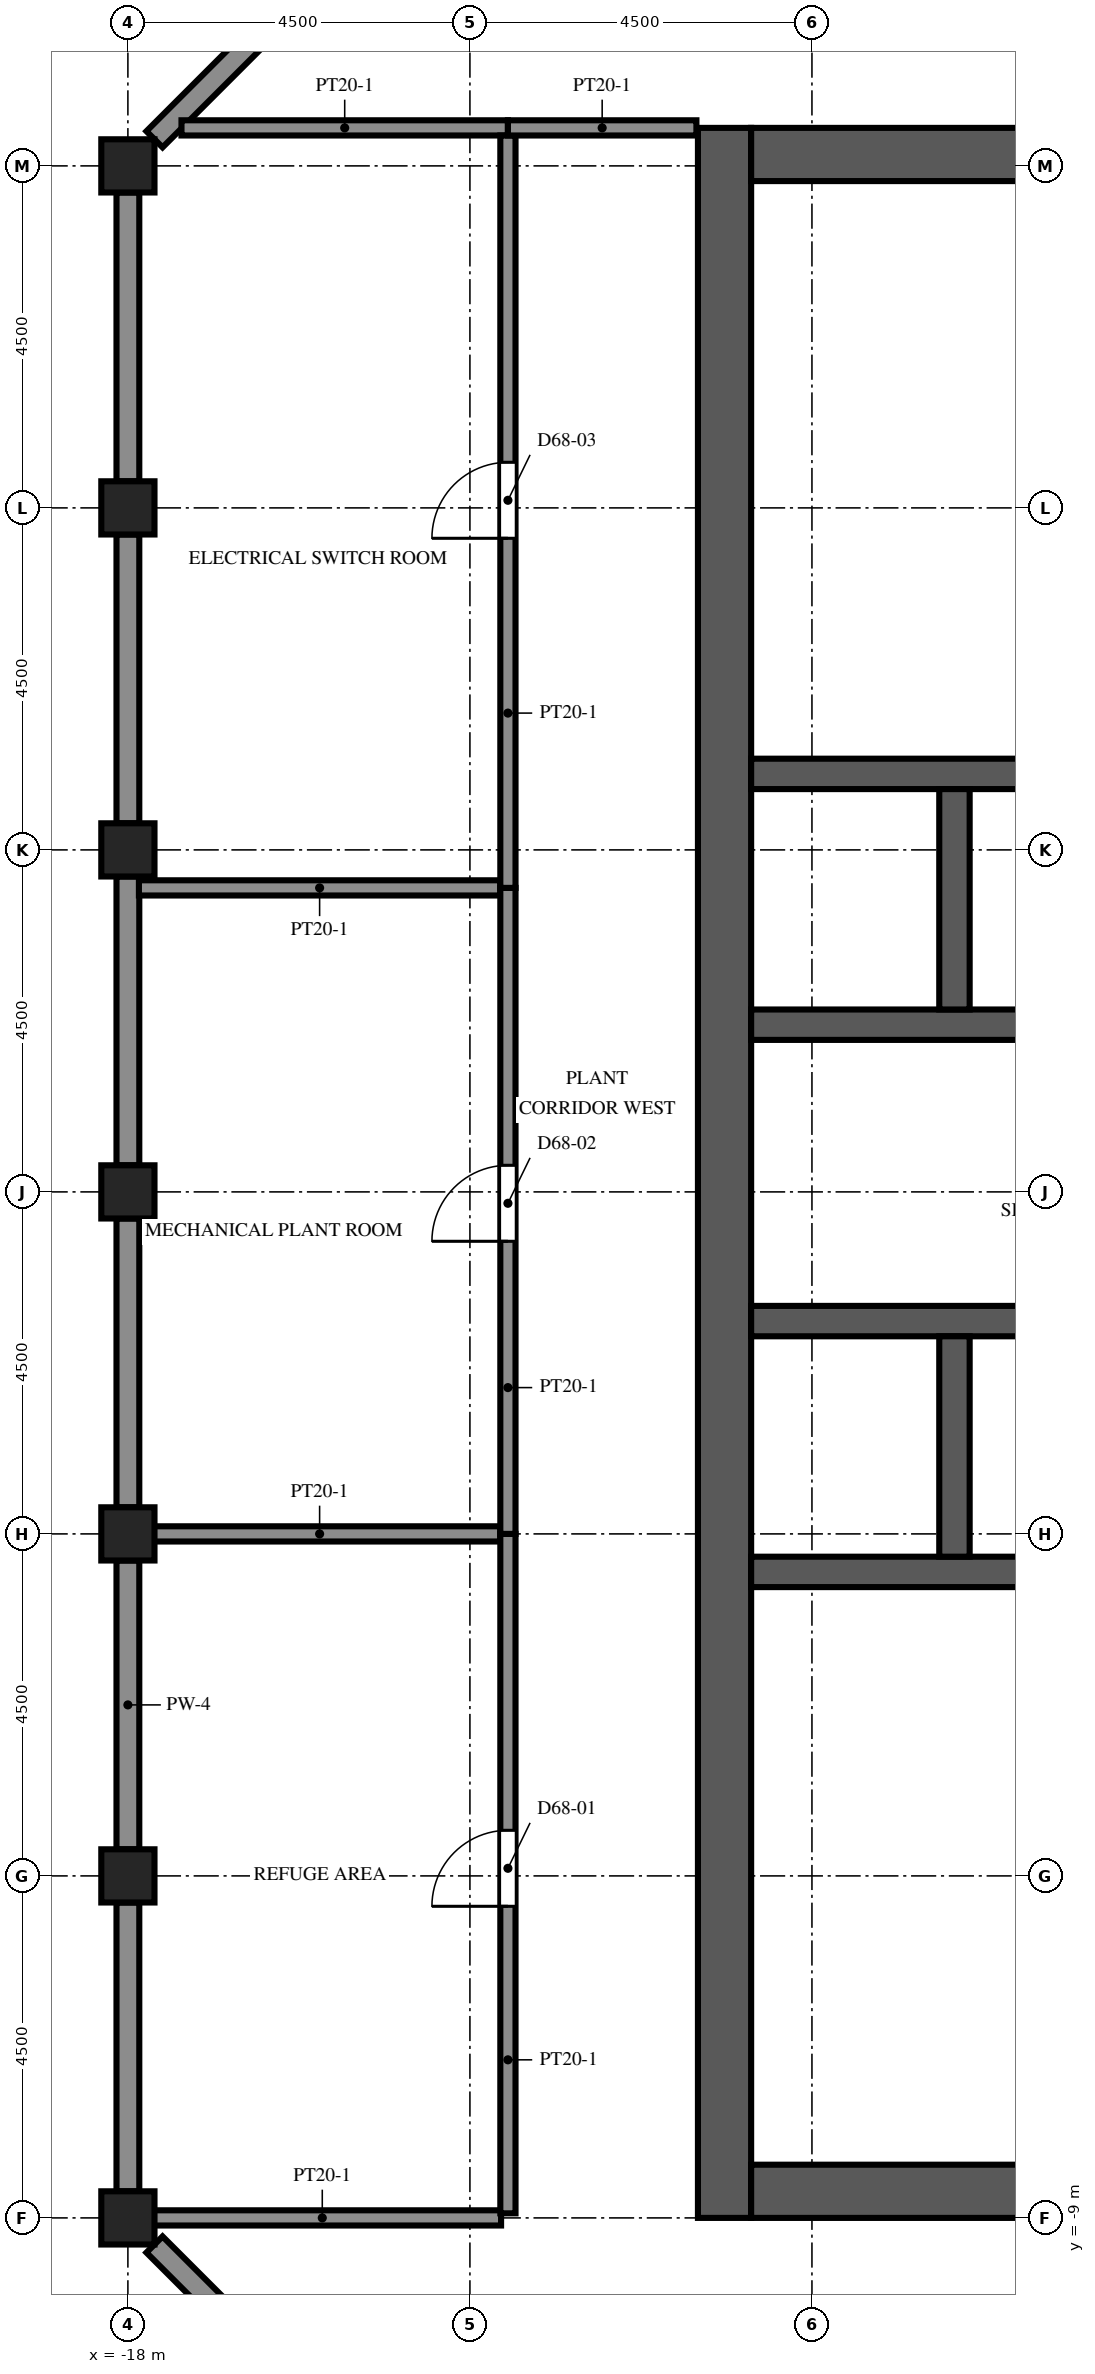
"""IFC4 building model, lengths in metres.
Left out: names, types, materials, properties, quantities, classifications, styles, units other than length and angle.
Written with IfcOpenShell. Run it as: python <this file> out.ifc"""

import sys

from ifc_helpers import new_model, si_unit, direction, frame, frame_2d, origin, origin_2d, place, context, subcontext, project, spatial, rectangle, extrude, element, fill, save


model = new_model("IFC4")
c1 = context("Model", 3, precision=1e-05, world=origin(), true_north=direction((0.0, 1.0)))
c2 = subcontext(c1, "Body", "Model", "MODEL_VIEW")
j1 = project(units=[si_unit("LENGTHUNIT", "METRE"), si_unit("PLANEANGLEUNIT", "RADIAN")], contexts=[c1])
p1 = place(None, origin())
s1 = spatial("IfcSite", under=j1, at=p1, CompositionType="ELEMENT")
p2 = place(p1, origin())
s2 = spatial("IfcBuilding", under=s1, at=p2, CompositionType="ELEMENT")
p3 = place(p2, frame((0.0, 0.0, 301.0)))
s3 = spatial("IfcBuildingStorey", under=s2, at=p3, CompositionType="ELEMENT", Elevation=301.0)
for number, where, z_axis, x_axis in (
    (1, (-18.0, -9.0, -0.6), (0.0, 0.0, 1.0), (1.0, 0.0, 0.0)),
    (2, (-18.0, -4.5, -0.6), (0.0, 0.0, 1.0), (1.0, 0.0, 0.0)),
    (3, (-18.0, 0.0, -0.6), (0.0, 0.0, 1.0), (1.0, 0.0, 0.0)),
    (4, (-18.0, 4.5, -0.6), (0.0, 0.0, 1.0), (1.0, 0.0, 0.0)),
    (5, (-18.0, 9.0, -0.6), (0.0, 0.0, 1.0), (1.0, 0.0, 0.0)),
    (6, (-18.0, 13.5, -0.6), (0.0, 0.0, 1.0), (1.0, 0.0, 0.0)),
    (7, (-18.0, 18.0, -0.6), (0.0, 0.0, 1.0), (1.0, 0.0, 0.0)),
):
    element("IfcColumn", number, at=place(p3, frame(where, z_axis=z_axis, x_axis=x_axis)), inside=s3, PredefinedType="COLUMN", context=c2, shape_type="SweptSolid", body=[
        extrude(rectangle(XDim=0.7, YDim=0.7, at=origin_2d()), origin(), (0.0, 0.0, 1.0), 6.0),
    ])
p4 = place(p3, frame((-10.15, -9.0, 0.0), z_axis=(0.0, 0.0, 1.0), x_axis=(0.0, 1.0, 0.0)))
e8 = element("IfcWall", 8, at=p4, inside=s3, PredefinedType="SHEAR", context=c2, shape_type="SweptSolid", body=[
    extrude(rectangle(XDim=27.5, YDim=0.7, at=frame_2d((13.75, 0.0))), origin(), (0.0, 0.0, 1.0), 5.4),
])
p5 = place(p4, frame((12.55, 0.0, 0.0)))
e9 = element("IfcOpeningElement", 9, at=p5, cuts=e8, PredefinedType="OPENING", context=c2, shape_type="SweptSolid", body=[
    extrude(rectangle(XDim=2.4, YDim=2.4, at=frame_2d((1.2, 1.2))), frame((0.0, 0.36, 0.0), z_axis=(0.0, -1.0, 0.0), x_axis=(1.0, 0.0, 0.0)), (0.0, 0.0, 1.0), 0.72),
])
p6 = place(p4, frame((6.825, 0.0, 0.0)))
e10 = element("IfcOpeningElement", 10, at=p6, cuts=e8, PredefinedType="OPENING", context=c2, shape_type="SweptSolid", body=[
    extrude(rectangle(XDim=1.2, YDim=2.1, at=frame_2d((0.6, 1.05))), frame((0.0, 0.36, 0.0), z_axis=(0.0, -1.0, 0.0), x_axis=(1.0, 0.0, 0.0)), (0.0, 0.0, 1.0), 0.72),
])
p7 = place(p4, frame((19.475, 0.0, 0.0)))
e11 = element("IfcOpeningElement", 11, at=p7, cuts=e8, PredefinedType="OPENING", context=c2, shape_type="SweptSolid", body=[
    extrude(rectangle(XDim=1.2, YDim=2.1, at=frame_2d((0.6, 1.05))), frame((0.0, 0.36, 0.0), z_axis=(0.0, -1.0, 0.0), x_axis=(1.0, 0.0, 0.0)), (0.0, 0.0, 1.0), 0.72),
])
for number, where, z_axis, x_axis in (
    (12, (-9.8, -8.65, 0.0), (0.0, 0.0, 1.0), (1.0, 0.0, 0.0)),
    (13, (-9.8, 18.15, 0.0), (0.0, 0.0, 1.0), (1.0, 0.0, 0.0)),
):
    element("IfcWall", number, at=place(p3, frame(where, z_axis=z_axis, x_axis=x_axis)), inside=s3, PredefinedType="SHEAR", context=c2, shape_type="SweptSolid", body=[
        extrude(rectangle(XDim=10.6, YDim=0.7, at=frame_2d((5.3, 0.0))), origin(), (0.0, 0.0, 1.0), 5.4),
    ])
p8 = place(p3, frame((-9.8, -0.5, 0.0), z_axis=(0.0, 0.0, 1.0), x_axis=(1.0, 0.0, 0.0)))
e14 = element("IfcWall", 14, at=p8, inside=s3, PredefinedType="SHEAR", context=c2, shape_type="SweptSolid", body=[
    extrude(rectangle(XDim=10.6, YDim=0.4, at=frame_2d((5.3, 0.0))), origin(), (0.0, 0.0, 1.0), 5.4),
])
p9 = place(p3, frame((-9.8, 2.8, 0.0), z_axis=(0.0, 0.0, 1.0), x_axis=(1.0, 0.0, 0.0)))
e15 = element("IfcWall", 15, at=p9, inside=s3, PredefinedType="SHEAR", context=c2, shape_type="SweptSolid", body=[
    extrude(rectangle(XDim=10.6, YDim=0.4, at=frame_2d((5.3, 0.0))), origin(), (0.0, 0.0, 1.0), 5.4),
])
p10 = place(p9, frame((0.688, 0.0, 0.0)))
e16 = element("IfcOpeningElement", 16, at=p10, cuts=e15, PredefinedType="OPENING", context=c2, shape_type="SweptSolid", body=[
    extrude(rectangle(XDim=1.1, YDim=2.1, at=frame_2d((0.55, 1.05))), frame((0.0, 0.21, 0.0), z_axis=(0.0, -1.0, 0.0), x_axis=(1.0, 0.0, 0.0)), (0.0, 0.0, 1.0), 0.42),
])
p11 = place(p9, frame((3.438, 0.0, 0.0)))
e17 = element("IfcOpeningElement", 17, at=p11, cuts=e15, PredefinedType="OPENING", context=c2, shape_type="SweptSolid", body=[
    extrude(rectangle(XDim=1.1, YDim=2.1, at=frame_2d((0.55, 1.05))), frame((0.0, 0.21, 0.0), z_axis=(0.0, -1.0, 0.0), x_axis=(1.0, 0.0, 0.0)), (0.0, 0.0, 1.0), 0.42),
])
p12 = place(p9, frame((6.113, 0.0, 0.0)))
e18 = element("IfcOpeningElement", 18, at=p12, cuts=e15, PredefinedType="OPENING", context=c2, shape_type="SweptSolid", body=[
    extrude(rectangle(XDim=1.0, YDim=2.1, at=frame_2d((0.5, 1.05))), frame((0.0, 0.21, 0.0), z_axis=(0.0, -1.0, 0.0), x_axis=(1.0, 0.0, 0.0)), (0.0, 0.0, 1.0), 0.42),
])
p13 = place(p9, frame((8.863, 0.0, 0.0)))
e19 = element("IfcOpeningElement", 19, at=p13, cuts=e15, PredefinedType="OPENING", context=c2, shape_type="SweptSolid", body=[
    extrude(rectangle(XDim=1.0, YDim=2.1, at=frame_2d((0.5, 1.05))), frame((0.0, 0.21, 0.0), z_axis=(0.0, -1.0, 0.0), x_axis=(1.0, 0.0, 0.0)), (0.0, 0.0, 1.0), 0.42),
])
p14 = place(p3, frame((-9.8, 6.7, 0.0), z_axis=(0.0, 0.0, 1.0), x_axis=(1.0, 0.0, 0.0)))
e20 = element("IfcWall", 20, at=p14, inside=s3, PredefinedType="SHEAR", context=c2, shape_type="SweptSolid", body=[
    extrude(rectangle(XDim=10.6, YDim=0.4, at=frame_2d((5.3, 0.0))), origin(), (0.0, 0.0, 1.0), 5.4),
])
p15 = place(p14, frame((0.738, 0.0, 0.0)))
e21 = element("IfcOpeningElement", 21, at=p15, cuts=e20, PredefinedType="OPENING", context=c2, shape_type="SweptSolid", body=[
    extrude(rectangle(XDim=1.0, YDim=2.1, at=frame_2d((0.5, 1.05))), frame((0.0, 0.21, 0.0), z_axis=(0.0, -1.0, 0.0), x_axis=(1.0, 0.0, 0.0)), (0.0, 0.0, 1.0), 0.42),
])
p16 = place(p14, frame((3.488, 0.0, 0.0)))
e22 = element("IfcOpeningElement", 22, at=p16, cuts=e20, PredefinedType="OPENING", context=c2, shape_type="SweptSolid", body=[
    extrude(rectangle(XDim=1.0, YDim=2.1, at=frame_2d((0.5, 1.05))), frame((0.0, 0.21, 0.0), z_axis=(0.0, -1.0, 0.0), x_axis=(1.0, 0.0, 0.0)), (0.0, 0.0, 1.0), 0.42),
])
p17 = place(p14, frame((6.113, 0.0, 0.0)))
e23 = element("IfcOpeningElement", 23, at=p17, cuts=e20, PredefinedType="OPENING", context=c2, shape_type="SweptSolid", body=[
    extrude(rectangle(XDim=1.0, YDim=2.1, at=frame_2d((0.5, 1.05))), frame((0.0, 0.21, 0.0), z_axis=(0.0, -1.0, 0.0), x_axis=(1.0, 0.0, 0.0)), (0.0, 0.0, 1.0), 0.42),
])
p18 = place(p14, frame((8.863, 0.0, 0.0)))
e24 = element("IfcOpeningElement", 24, at=p18, cuts=e20, PredefinedType="OPENING", context=c2, shape_type="SweptSolid", body=[
    extrude(rectangle(XDim=1.0, YDim=2.1, at=frame_2d((0.5, 1.05))), frame((0.0, 0.21, 0.0), z_axis=(0.0, -1.0, 0.0), x_axis=(1.0, 0.0, 0.0)), (0.0, 0.0, 1.0), 0.42),
])
p19 = place(p3, frame((-9.8, 10.0, 0.0), z_axis=(0.0, 0.0, 1.0), x_axis=(1.0, 0.0, 0.0)))
e25 = element("IfcWall", 25, at=p19, inside=s3, PredefinedType="SHEAR", context=c2, shape_type="SweptSolid", body=[
    extrude(rectangle(XDim=10.6, YDim=0.4, at=frame_2d((5.3, 0.0))), origin(), (0.0, 0.0, 1.0), 5.4),
])
for number, where, z_axis, x_axis in (
    (26, (-7.125, -0.3, 0.0), (0.0, 0.0, 1.0), (0.0, 1.0, 0.0)),
    (27, (-7.125, 6.9, 0.0), (0.0, 0.0, 1.0), (0.0, 1.0, 0.0)),
):
    element("IfcWall", number, at=place(p3, frame(where, z_axis=z_axis, x_axis=x_axis)), inside=s3, PredefinedType="SHEAR", context=c2, shape_type="SweptSolid", body=[
        extrude(rectangle(XDim=2.9, YDim=0.4, at=frame_2d((1.45, 0.0))), origin(), (0.0, 0.0, 1.0), 5.4),
    ])
p20 = place(p3, frame((-13.85, 22.15, 0.0), z_axis=(0.0, 0.0, 1.0), x_axis=(-0.707106781187, -0.707106781187, 0.0)))
e28 = element("IfcWall", 28, at=p20, inside=s3, PredefinedType="SOLIDWALL", context=c2, shape_type="SweptSolid", body=[
    extrude(rectangle(XDim=5.374, YDim=0.3, at=frame_2d((2.687, 0.0))), origin(), (0.0, 0.0, 1.0), 4.1),
])
for number, where, z_axis, x_axis in (
    (29, (-18.0, 17.65, 0.0), (0.0, 0.0, 1.0), (0.0, -1.0, 0.0)),
    (30, (-18.0, 13.15, 0.0), (0.0, 0.0, 1.0), (0.0, -1.0, 0.0)),
    (31, (-18.0, 8.65, 0.0), (0.0, 0.0, 1.0), (0.0, -1.0, 0.0)),
    (32, (-18.0, 4.15, 0.0), (0.0, 0.0, 1.0), (0.0, -1.0, 0.0)),
):
    element("IfcWall", number, at=place(p3, frame(where, z_axis=z_axis, x_axis=x_axis)), inside=s3, PredefinedType="SOLIDWALL", context=c2, shape_type="SweptSolid", body=[
        extrude(rectangle(XDim=3.8, YDim=0.3, at=frame_2d((1.9, 0.0))), origin(), (0.0, 0.0, 1.0), 0.85),
    ])
p21 = place(p3, frame((-18.0, -0.35, 0.0), z_axis=(0.0, 0.0, 1.0), x_axis=(0.0, -1.0, 0.0)))
e33 = element("IfcWall", 33, at=p21, inside=s3, PredefinedType="SOLIDWALL", context=c2, shape_type="SweptSolid", body=[
    extrude(rectangle(XDim=3.8, YDim=0.3, at=frame_2d((1.9, 0.0))), origin(), (0.0, 0.0, 1.0), 4.1),
])
p22 = place(p3, frame((-18.0, -4.85, 0.0), z_axis=(0.0, 0.0, 1.0), x_axis=(0.0, -1.0, 0.0)))
e34 = element("IfcWall", 34, at=p22, inside=s3, PredefinedType="SOLIDWALL", context=c2, shape_type="SweptSolid", body=[
    extrude(rectangle(XDim=3.8, YDim=0.3, at=frame_2d((1.9, 0.0))), origin(), (0.0, 0.0, 1.0), 0.85),
])
p23 = place(p3, frame((-17.65, -9.35, 0.0), z_axis=(0.0, 0.0, 1.0), x_axis=(0.707106781187, -0.707106781187, 0.0)))
e35 = element("IfcWall", 35, at=p23, inside=s3, PredefinedType="SOLIDWALL", context=c2, shape_type="SweptSolid", body=[
    extrude(rectangle(XDim=5.374, YDim=0.3, at=frame_2d((2.687, 0.0))), origin(), (0.0, 0.0, 1.0), 4.1),
])
for number, where, z_axis, x_axis in (
    (36, (-17.855, 0.0, 0.0), (0.0, 0.0, 1.0), (1.0, 0.0, 0.0)),
    (37, (-17.855, 8.5, 0.0), (0.0, 0.0, 1.0), (1.0, 0.0, 0.0)),
):
    element("IfcWall", number, at=place(p3, frame(where, z_axis=z_axis, x_axis=x_axis)), inside=s3, PredefinedType="PARTITIONING", context=c2, shape_type="SweptSolid", body=[
        extrude(rectangle(XDim=4.755, YDim=0.2, at=frame_2d((2.377, 0.0))), origin(), (0.0, 0.0, 1.0), 4.8),
    ])
p24 = place(p3, frame((-17.795, -9.0, 0.0), z_axis=(0.0, 0.0, 1.0), x_axis=(1.0, 0.0, 0.0)))
e38 = element("IfcWall", 38, at=p24, inside=s3, PredefinedType="PARTITIONING", context=c2, shape_type="SweptSolid", body=[
    extrude(rectangle(XDim=4.705, YDim=0.2, at=frame_2d((2.353, 0.0))), origin(), (0.0, 0.0, 1.0), 4.8),
])
p25 = place(p3, frame((-17.295, 18.5, 0.0), z_axis=(0.0, 0.0, 1.0), x_axis=(1.0, 0.0, 0.0)))
e39 = element("IfcWall", 39, at=p25, inside=s3, PredefinedType="PARTITIONING", context=c2, shape_type="SweptSolid", body=[
    extrude(rectangle(XDim=4.295, YDim=0.2, at=frame_2d((2.147, 0.0))), origin(), (0.0, 0.0, 1.0), 4.8),
])
p26 = place(p3, frame((-13.0, -8.94, 0.0), z_axis=(0.0, 0.0, 1.0), x_axis=(0.0, 1.0, 0.0)))
e40 = element("IfcWall", 40, at=p26, inside=s3, PredefinedType="PARTITIONING", context=c2, shape_type="SweptSolid", body=[
    extrude(rectangle(XDim=8.94, YDim=0.2, at=frame_2d((4.47, 0.0))), origin(), (0.0, 0.0, 1.0), 4.8),
])
p27 = place(p26, frame((4.04, 0.0, 0.0)))
e41 = element("IfcOpeningElement", 41, at=p27, cuts=e40, PredefinedType="OPENING", context=c2, shape_type="SweptSolid", body=[
    extrude(rectangle(XDim=1.0, YDim=2.1, at=frame_2d((0.5, 1.05))), frame((0.0, 0.11, 0.0), z_axis=(0.0, -1.0, 0.0), x_axis=(1.0, 0.0, 0.0)), (0.0, 0.0, 1.0), 0.22),
])
p28 = place(p3, frame((-13.0, 0.0, 0.0), z_axis=(0.0, 0.0, 1.0), x_axis=(0.0, 1.0, 0.0)))
e42 = element("IfcWall", 42, at=p28, inside=s3, PredefinedType="PARTITIONING", context=c2, shape_type="SweptSolid", body=[
    extrude(rectangle(XDim=8.5, YDim=0.2, at=frame_2d((4.25, 0.0))), origin(), (0.0, 0.0, 1.0), 4.8),
])
p29 = place(p28, frame((3.85, 0.0, 0.0)))
e43 = element("IfcOpeningElement", 43, at=p29, cuts=e42, PredefinedType="OPENING", context=c2, shape_type="SweptSolid", body=[
    extrude(rectangle(XDim=1.0, YDim=2.1, at=frame_2d((0.5, 1.05))), frame((0.0, 0.11, 0.0), z_axis=(0.0, -1.0, 0.0), x_axis=(1.0, 0.0, 0.0)), (0.0, 0.0, 1.0), 0.22),
])
p30 = place(p3, frame((-13.0, 8.5, 0.0), z_axis=(0.0, 0.0, 1.0), x_axis=(0.0, 1.0, 0.0)))
e44 = element("IfcWall", 44, at=p30, inside=s3, PredefinedType="PARTITIONING", context=c2, shape_type="SweptSolid", body=[
    extrude(rectangle(XDim=9.9, YDim=0.2, at=frame_2d((4.95, 0.0))), origin(), (0.0, 0.0, 1.0), 4.8),
])
p31 = place(p30, frame((4.6, 0.0, 0.0)))
e45 = element("IfcOpeningElement", 45, at=p31, cuts=e44, PredefinedType="OPENING", context=c2, shape_type="SweptSolid", body=[
    extrude(rectangle(XDim=1.0, YDim=2.1, at=frame_2d((0.5, 1.05))), frame((0.0, 0.11, 0.0), z_axis=(0.0, -1.0, 0.0), x_axis=(1.0, 0.0, 0.0)), (0.0, 0.0, 1.0), 0.22),
])
p32 = place(p3, frame((-13.0, 18.5, 0.0), z_axis=(0.0, 0.0, 1.0), x_axis=(1.0, 0.0, 0.0)))
e46 = element("IfcWall", 46, at=p32, inside=s3, PredefinedType="PARTITIONING", context=c2, shape_type="SweptSolid", body=[
    extrude(rectangle(XDim=2.48, YDim=0.2, at=frame_2d((1.24, 0.0))), origin(), (0.0, 0.0, 1.0), 4.8),
])
p33 = place(p27, origin())
e47 = element("IfcDoor", 47, at=p33, inside=s3, OperationType="SINGLE_SWING_LEFT", PredefinedType="DOOR", context=c2, shape_type="SweptSolid", body=[
    extrude(rectangle(XDim=1.0, YDim=2.1, at=frame_2d((0.5, 1.05))), frame((0.0, 0.025, 0.0), z_axis=(0.0, -1.0, 0.0), x_axis=(1.0, 0.0, 0.0)), (0.0, 0.0, 1.0), 0.05),
])
fill(e41, e47)
p34 = place(p29, origin())
e48 = element("IfcDoor", 48, at=p34, inside=s3, OperationType="SINGLE_SWING_LEFT", PredefinedType="DOOR", context=c2, shape_type="SweptSolid", body=[
    extrude(rectangle(XDim=1.0, YDim=2.1, at=frame_2d((0.5, 1.05))), frame((0.0, 0.025, 0.0), z_axis=(0.0, -1.0, 0.0), x_axis=(1.0, 0.0, 0.0)), (0.0, 0.0, 1.0), 0.05),
])
fill(e43, e48)
p35 = place(p31, origin())
e49 = element("IfcDoor", 49, at=p35, inside=s3, OperationType="SINGLE_SWING_LEFT", PredefinedType="DOOR", context=c2, shape_type="SweptSolid", body=[
    extrude(rectangle(XDim=1.0, YDim=2.1, at=frame_2d((0.5, 1.05))), frame((0.0, 0.025, 0.0), z_axis=(0.0, -1.0, 0.0), x_axis=(1.0, 0.0, 0.0)), (0.0, 0.0, 1.0), 0.05),
])
fill(e45, e49)
p36 = place(p10, origin())
e50 = element("IfcDoor", 50, at=p36, inside=s3, OperationType="DOUBLE_DOOR_SLIDING", PredefinedType="DOOR", context=c2, shape_type="SweptSolid", body=[
    extrude(rectangle(XDim=1.1, YDim=2.1, at=frame_2d((0.55, 1.05))), frame((0.0, 0.025, 0.0), z_axis=(0.0, -1.0, 0.0), x_axis=(1.0, 0.0, 0.0)), (0.0, 0.0, 1.0), 0.05),
])
fill(e16, e50)
p37 = place(p11, origin())
e51 = element("IfcDoor", 51, at=p37, inside=s3, OperationType="DOUBLE_DOOR_SLIDING", PredefinedType="DOOR", context=c2, shape_type="SweptSolid", body=[
    extrude(rectangle(XDim=1.1, YDim=2.1, at=frame_2d((0.55, 1.05))), frame((0.0, 0.025, 0.0), z_axis=(0.0, -1.0, 0.0), x_axis=(1.0, 0.0, 0.0)), (0.0, 0.0, 1.0), 0.05),
])
fill(e17, e51)
p38 = place(p5, origin())
e52 = element("IfcDoor", 52, at=p38, inside=s3, OperationType="DOUBLE_DOOR_DOUBLE_SWING", PredefinedType="DOOR", context=c2, shape_type="SweptSolid", body=[
    extrude(rectangle(XDim=2.4, YDim=2.4, at=frame_2d((1.2, 1.2))), frame((0.0, 0.025, 0.0), z_axis=(0.0, -1.0, 0.0), x_axis=(1.0, 0.0, 0.0)), (0.0, 0.0, 1.0), 0.05),
])
fill(e9, e52)
p39 = place(p6, origin())
e53 = element("IfcDoor", 53, at=p39, inside=s3, OperationType="SINGLE_SWING_LEFT", PredefinedType="DOOR", context=c2, shape_type="SweptSolid", body=[
    extrude(rectangle(XDim=1.2, YDim=2.1, at=frame_2d((0.6, 1.05))), frame((0.0, 0.025, 0.0), z_axis=(0.0, -1.0, 0.0), x_axis=(1.0, 0.0, 0.0)), (0.0, 0.0, 1.0), 0.05),
])
fill(e10, e53)
p40 = place(p7, origin())
e54 = element("IfcDoor", 54, at=p40, inside=s3, OperationType="SINGLE_SWING_LEFT", PredefinedType="DOOR", context=c2, shape_type="SweptSolid", body=[
    extrude(rectangle(XDim=1.2, YDim=2.1, at=frame_2d((0.6, 1.05))), frame((0.0, 0.025, 0.0), z_axis=(0.0, -1.0, 0.0), x_axis=(1.0, 0.0, 0.0)), (0.0, 0.0, 1.0), 0.05),
])
fill(e11, e54)
p41 = place(p15, origin())
e55 = element("IfcDoor", 55, at=p41, inside=s3, OperationType="SINGLE_SWING_LEFT", PredefinedType="DOOR", context=c2, shape_type="SweptSolid", body=[
    extrude(rectangle(XDim=1.0, YDim=2.1, at=frame_2d((0.5, 1.05))), frame((0.0, 0.025, 0.0), z_axis=(0.0, -1.0, 0.0), x_axis=(1.0, 0.0, 0.0)), (0.0, 0.0, 1.0), 0.05),
])
fill(e21, e55)
save(model, sys.argv[1])
